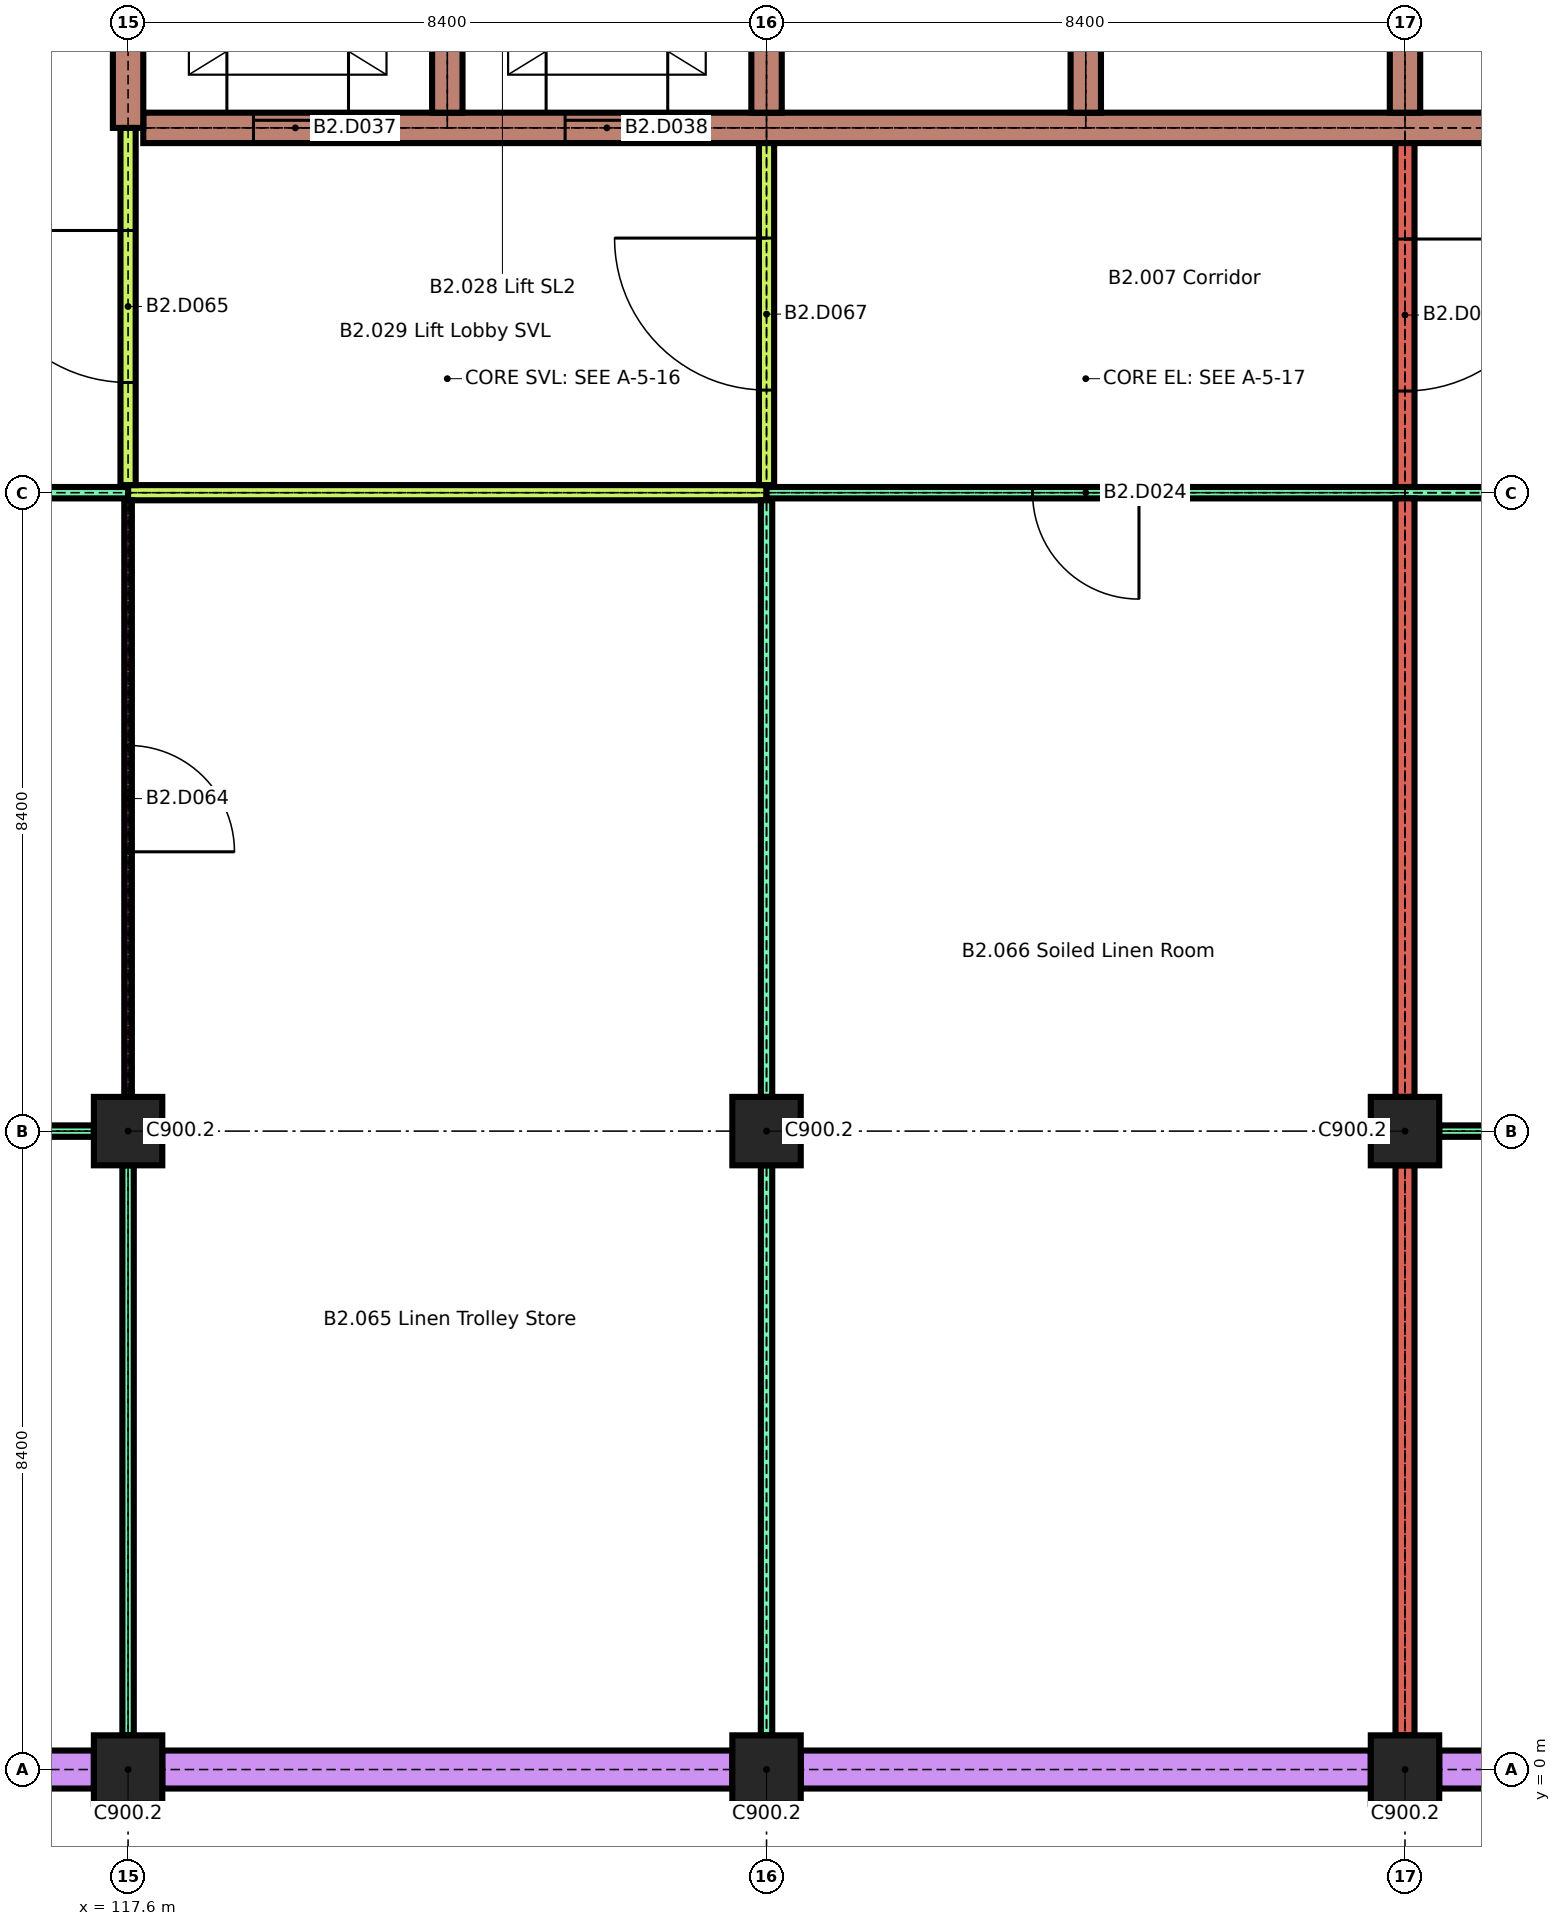
"""IFC4 building model, lengths in metres.
Left out: names, types, materials, properties, quantities, classifications, styles, units other than length and angle.
Written with IfcOpenShell. Run it as: python <this file> out.ifc"""

import sys

from ifc_helpers import new_model, si_unit, direction, frame, frame_2d, origin, origin_2d, place, context, subcontext, project, spatial, rectangle, extrude, element, fill, save


model = new_model("IFC4")
c1 = context("Model", 3, precision=1e-05, world=origin(), true_north=direction((0.0, 1.0)))
c2 = subcontext(c1, "Body", "Model", "MODEL_VIEW")
j1 = project(units=[si_unit("LENGTHUNIT", "METRE"), si_unit("PLANEANGLEUNIT", "RADIAN")], contexts=[c1])
p1 = place(None, origin())
s1 = spatial("IfcSite", under=j1, at=p1, CompositionType="ELEMENT")
p2 = place(p1, origin())
s2 = spatial("IfcBuilding", under=s1, at=p2, CompositionType="ELEMENT")
p3 = place(p2, frame((0.0, 0.0, -7.8)))
s3 = spatial("IfcBuildingStorey", under=s2, at=p3, CompositionType="ELEMENT", Elevation=-7.8)
for number, where, z_axis, x_axis in (
    (1, (117.6, 0.0, 0.0), (0.0, 0.0, 1.0), (1.0, 0.0, 0.0)),
    (2, (126.0, 0.0, 0.0), (0.0, 0.0, 1.0), (1.0, 0.0, 0.0)),
    (3, (134.4, 0.0, 0.0), (0.0, 0.0, 1.0), (1.0, 0.0, 0.0)),
    (4, (117.6, 8.4, 0.0), (0.0, 0.0, 1.0), (1.0, 0.0, 0.0)),
    (5, (126.0, 8.4, 0.0), (0.0, 0.0, 1.0), (1.0, 0.0, 0.0)),
    (6, (134.4, 8.4, 0.0), (0.0, 0.0, 1.0), (1.0, 0.0, 0.0)),
):
    element("IfcColumn", number, at=place(p3, frame(where, z_axis=z_axis, x_axis=x_axis)), inside=s3, PredefinedType="COLUMN", context=c2, shape_type="SweptSolid", body=[
        extrude(rectangle(XDim=0.9, YDim=0.9, at=origin_2d()), origin(), (0.0, 0.0, 1.0), 3.1),
    ])
for number, where, z_axis, x_axis in (
    (7, (109.65, 0.0, 0.0), (0.0, 0.0, 1.0), (1.0, 0.0, 0.0)),
    (8, (118.05, 0.0, 0.0), (0.0, 0.0, 1.0), (1.0, 0.0, 0.0)),
    (9, (126.45, 0.0, 0.0), (0.0, 0.0, 1.0), (1.0, 0.0, 0.0)),
    (10, (134.85, 0.0, 0.0), (0.0, 0.0, 1.0), (1.0, 0.0, 0.0)),
):
    element("IfcWall", number, at=place(p3, frame(where, z_axis=z_axis, x_axis=x_axis)), inside=s3, PredefinedType="SOLIDWALL", context=c2, shape_type="SweptSolid", body=[
        extrude(rectangle(XDim=7.5, YDim=0.5, at=frame_2d((3.75, 0.0))), origin(), (0.0, 0.0, 1.0), 3.1),
    ])
p4 = place(p3, frame((109.65, 8.4, 0.0), z_axis=(0.0, 0.0, 1.0), x_axis=(1.0, 0.0, 0.0)))
e11 = element("IfcWall", 11, at=p4, inside=s3, PredefinedType="PARTITIONING", context=c2, shape_type="SweptSolid", body=[
    extrude(rectangle(XDim=7.5, YDim=0.15, at=frame_2d((3.75, 0.0))), origin(), (0.0, 0.0, 1.0), 3.1),
])
p5 = place(p4, frame((3.05, 0.0, 0.0)))
e12 = element("IfcOpeningElement", 12, at=p5, cuts=e11, PredefinedType="OPENING", context=c2, shape_type="SweptSolid", body=[
    extrude(rectangle(XDim=1.4, YDim=2.1, at=frame_2d((0.7, 1.05))), frame((0.0, 0.085, 0.0), z_axis=(0.0, -1.0, 0.0), x_axis=(1.0, 0.0, 0.0)), (0.0, 0.0, 1.0), 0.17),
])
p6 = place(p3, frame((134.85, 8.4, 0.0), z_axis=(0.0, 0.0, 1.0), x_axis=(1.0, 0.0, 0.0)))
e13 = element("IfcWall", 13, at=p6, inside=s3, PredefinedType="PARTITIONING", context=c2, shape_type="SweptSolid", body=[
    extrude(rectangle(XDim=7.5, YDim=0.15, at=frame_2d((3.75, 0.0))), origin(), (0.0, 0.0, 1.0), 3.1),
])
p7 = place(p6, frame((3.2, 0.0, 0.0)))
e14 = element("IfcOpeningElement", 14, at=p7, cuts=e13, PredefinedType="OPENING", context=c2, shape_type="SweptSolid", body=[
    extrude(rectangle(XDim=1.1, YDim=2.1, at=frame_2d((0.55, 1.05))), frame((0.0, 0.085, 0.0), z_axis=(0.0, -1.0, 0.0), x_axis=(1.0, 0.0, 0.0)), (0.0, 0.0, 1.0), 0.17),
])
p8 = place(p3, frame((109.65, 16.8, 0.0), z_axis=(0.0, 0.0, 1.0), x_axis=(1.0, 0.0, 0.0)))
e15 = element("IfcWall", 15, at=p8, inside=s3, PredefinedType="PARTITIONING", context=c2, shape_type="SweptSolid", body=[
    extrude(rectangle(XDim=7.95, YDim=0.15, at=frame_2d((3.975, 0.0))), origin(), (0.0, 0.0, 1.0), 3.1),
])
p9 = place(p8, frame((3.275, 0.0, 0.0)))
e16 = element("IfcOpeningElement", 16, at=p9, cuts=e15, PredefinedType="OPENING", context=c2, shape_type="SweptSolid", body=[
    extrude(rectangle(XDim=1.4, YDim=2.1, at=frame_2d((0.7, 1.05))), frame((0.0, 0.085, 0.0), z_axis=(0.0, -1.0, 0.0), x_axis=(1.0, 0.0, 0.0)), (0.0, 0.0, 1.0), 0.17),
])
p10 = place(p3, frame((117.6, 16.8, 0.0), z_axis=(0.0, 0.0, 1.0), x_axis=(1.0, 0.0, 0.0)))
e17 = element("IfcWall", 17, at=p10, inside=s3, PredefinedType="PARTITIONING", context=c2, shape_type="SweptSolid", body=[
    extrude(rectangle(XDim=8.4, YDim=0.2, at=frame_2d((4.2, 0.0))), origin(), (0.0, 0.0, 1.0), 3.1),
])
p11 = place(p3, frame((126.0, 16.8, 0.0), z_axis=(0.0, 0.0, 1.0), x_axis=(1.0, 0.0, 0.0)))
e18 = element("IfcWall", 18, at=p11, inside=s3, PredefinedType="PARTITIONING", context=c2, shape_type="SweptSolid", body=[
    extrude(rectangle(XDim=24.75, YDim=0.15, at=frame_2d((12.375, 0.0))), origin(), (0.0, 0.0, 1.0), 3.1),
])
p12 = place(p11, frame((3.5, 0.0, 0.0)))
e19 = element("IfcOpeningElement", 19, at=p12, cuts=e18, PredefinedType="OPENING", context=c2, shape_type="SweptSolid", body=[
    extrude(rectangle(XDim=1.4, YDim=2.1, at=frame_2d((0.7, 1.05))), frame((0.0, 0.085, 0.0), z_axis=(0.0, -1.0, 0.0), x_axis=(1.0, 0.0, 0.0)), (0.0, 0.0, 1.0), 0.17),
])
p13 = place(p11, frame((11.9, 0.0, 0.0)))
e20 = element("IfcOpeningElement", 20, at=p13, cuts=e18, PredefinedType="OPENING", context=c2, shape_type="SweptSolid", body=[
    extrude(rectangle(XDim=1.4, YDim=2.1, at=frame_2d((0.7, 1.05))), frame((0.0, 0.085, 0.0), z_axis=(0.0, -1.0, 0.0), x_axis=(1.0, 0.0, 0.0)), (0.0, 0.0, 1.0), 0.17),
])
p14 = place(p11, frame((20.075, 0.0, 0.0)))
e21 = element("IfcOpeningElement", 21, at=p14, cuts=e18, PredefinedType="OPENING", context=c2, shape_type="SweptSolid", body=[
    extrude(rectangle(XDim=1.4, YDim=2.1, at=frame_2d((0.7, 1.05))), frame((0.0, 0.085, 0.0), z_axis=(0.0, -1.0, 0.0), x_axis=(1.0, 0.0, 0.0)), (0.0, 0.0, 1.0), 0.17),
])
p15 = place(p3, frame((117.8, 21.6, 0.0), z_axis=(0.0, 0.0, 1.0), x_axis=(1.0, 0.0, 0.0)))
e22 = element("IfcWall", 22, at=p15, inside=s3, PredefinedType="SHEAR", context=c2, shape_type="SweptSolid", body=[
    extrude(rectangle(XDim=25.0, YDim=0.4, at=frame_2d((12.5, 0.0))), origin(), (0.0, 0.0, 1.0), 3.1),
])
p16 = place(p15, frame((1.45, 0.0, 0.0)))
e23 = element("IfcOpeningElement", 23, at=p16, cuts=e22, PredefinedType="OPENING", context=c2, shape_type="SweptSolid", body=[
    extrude(rectangle(XDim=1.1, YDim=2.1, at=frame_2d((0.55, 1.05))), frame((0.0, 0.21, 0.0), z_axis=(0.0, -1.0, 0.0), x_axis=(1.0, 0.0, 0.0)), (0.0, 0.0, 1.0), 0.42),
])
p17 = place(p15, frame((5.55, 0.0, 0.0)))
e24 = element("IfcOpeningElement", 24, at=p17, cuts=e22, PredefinedType="OPENING", context=c2, shape_type="SweptSolid", body=[
    extrude(rectangle(XDim=1.1, YDim=2.1, at=frame_2d((0.55, 1.05))), frame((0.0, 0.21, 0.0), z_axis=(0.0, -1.0, 0.0), x_axis=(1.0, 0.0, 0.0)), (0.0, 0.0, 1.0), 0.42),
])
p18 = place(p3, frame((117.6, 0.45, 0.0), z_axis=(0.0, 0.0, 1.0), x_axis=(0.0, 1.0, 0.0)))
e25 = element("IfcWall", 25, at=p18, inside=s3, PredefinedType="PARTITIONING", context=c2, shape_type="SweptSolid", body=[
    extrude(rectangle(XDim=7.5, YDim=0.15, at=frame_2d((3.75, 0.0))), origin(), (0.0, 0.0, 1.0), 3.1),
])
p19 = place(p3, frame((117.6, 8.85, 0.0), z_axis=(0.0, 0.0, 1.0), x_axis=(0.0, 1.0, 0.0)))
e26 = element("IfcWall", 26, at=p19, inside=s3, PredefinedType="PARTITIONING", context=c2, shape_type="SweptSolid", body=[
    extrude(rectangle(XDim=7.85, YDim=0.1, at=frame_2d((3.925, 0.0))), origin(), (0.0, 0.0, 1.0), 3.1),
])
p20 = place(p19, frame((3.225, 0.0, 0.0)))
e27 = element("IfcOpeningElement", 27, at=p20, cuts=e26, PredefinedType="OPENING", context=c2, shape_type="SweptSolid", body=[
    extrude(rectangle(XDim=1.4, YDim=2.1, at=frame_2d((0.7, 1.05))), frame((0.0, 0.06, 0.0), z_axis=(0.0, -1.0, 0.0), x_axis=(1.0, 0.0, 0.0)), (0.0, 0.0, 1.0), 0.12),
])
p21 = place(p3, frame((117.6, 16.9, 0.0), z_axis=(0.0, 0.0, 1.0), x_axis=(0.0, 1.0, 0.0)))
e28 = element("IfcWall", 28, at=p21, inside=s3, PredefinedType="PARTITIONING", context=c2, shape_type="SweptSolid", body=[
    extrude(rectangle(XDim=4.7, YDim=0.2, at=frame_2d((2.35, 0.0))), origin(), (0.0, 0.0, 1.0), 3.1),
])
p22 = place(p21, frame((1.35, 0.0, 0.0)))
e29 = element("IfcOpeningElement", 29, at=p22, cuts=e28, PredefinedType="OPENING", context=c2, shape_type="SweptSolid", body=[
    extrude(rectangle(XDim=2.0, YDim=2.4, at=frame_2d((1.0, 1.2))), frame((0.0, 0.11, 0.0), z_axis=(0.0, -1.0, 0.0), x_axis=(1.0, 0.0, 0.0)), (0.0, 0.0, 1.0), 0.22),
])
p23 = place(p3, frame((117.6, 21.6, 0.0), z_axis=(0.0, 0.0, 1.0), x_axis=(0.0, 1.0, 0.0)))
e30 = element("IfcWall", 30, at=p23, inside=s3, PredefinedType="SHEAR", context=c2, shape_type="SweptSolid", body=[
    extrude(rectangle(XDim=3.6, YDim=0.4, at=frame_2d((1.8, 0.0))), origin(), (0.0, 0.0, 1.0), 3.1),
])
p24 = place(p3, frame((121.8, 21.8, 0.0), z_axis=(0.0, 0.0, 1.0), x_axis=(0.0, 1.0, 0.0)))
e31 = element("IfcWall", 31, at=p24, inside=s3, PredefinedType="SHEAR", context=c2, shape_type="SweptSolid", body=[
    extrude(rectangle(XDim=3.2, YDim=0.4, at=frame_2d((1.6, 0.0))), origin(), (0.0, 0.0, 1.0), 3.1),
])
p25 = place(p3, frame((126.0, 0.45, 0.0), z_axis=(0.0, 0.0, 1.0), x_axis=(0.0, 1.0, 0.0)))
e32 = element("IfcWall", 32, at=p25, inside=s3, PredefinedType="PARTITIONING", context=c2, shape_type="SweptSolid", body=[
    extrude(rectangle(XDim=7.5, YDim=0.15, at=frame_2d((3.75, 0.0))), origin(), (0.0, 0.0, 1.0), 3.1),
])
p26 = place(p3, frame((126.0, 8.85, 0.0), z_axis=(0.0, 0.0, 1.0), x_axis=(0.0, 1.0, 0.0)))
e33 = element("IfcWall", 33, at=p26, inside=s3, PredefinedType="PARTITIONING", context=c2, shape_type="SweptSolid", body=[
    extrude(rectangle(XDim=7.85, YDim=0.15, at=frame_2d((3.925, 0.0))), origin(), (0.0, 0.0, 1.0), 3.1),
])
p27 = place(p3, frame((126.0, 16.9, 0.0), z_axis=(0.0, 0.0, 1.0), x_axis=(0.0, 1.0, 0.0)))
e34 = element("IfcWall", 34, at=p27, inside=s3, PredefinedType="PARTITIONING", context=c2, shape_type="SweptSolid", body=[
    extrude(rectangle(XDim=4.5, YDim=0.2, at=frame_2d((2.25, 0.0))), origin(), (0.0, 0.0, 1.0), 3.1),
])
p28 = place(p27, frame((1.25, 0.0, 0.0)))
e35 = element("IfcOpeningElement", 35, at=p28, cuts=e34, PredefinedType="OPENING", context=c2, shape_type="SweptSolid", body=[
    extrude(rectangle(XDim=2.0, YDim=2.4, at=frame_2d((1.0, 1.2))), frame((0.0, 0.11, 0.0), z_axis=(0.0, -1.0, 0.0), x_axis=(1.0, 0.0, 0.0)), (0.0, 0.0, 1.0), 0.22),
])
for number, where, z_axis, x_axis in (
    (36, (126.0, 21.8, 0.0), (0.0, 0.0, 1.0), (0.0, 1.0, 0.0)),
    (37, (130.2, 21.8, 0.0), (0.0, 0.0, 1.0), (0.0, 1.0, 0.0)),
):
    element("IfcWall", number, at=place(p3, frame(where, z_axis=z_axis, x_axis=x_axis)), inside=s3, PredefinedType="SHEAR", context=c2, shape_type="SweptSolid", body=[
        extrude(rectangle(XDim=3.2, YDim=0.4, at=frame_2d((1.6, 0.0))), origin(), (0.0, 0.0, 1.0), 3.1),
    ])
p29 = place(p3, frame((134.4, 0.45, 0.0), z_axis=(0.0, 0.0, 1.0), x_axis=(0.0, 1.0, 0.0)))
e38 = element("IfcWall", 38, at=p29, inside=s3, PredefinedType="SOLIDWALL", context=c2, shape_type="SweptSolid", body=[
    extrude(rectangle(XDim=7.5, YDim=0.25, at=frame_2d((3.75, 0.0))), origin(), (0.0, 0.0, 1.0), 3.1),
])
p30 = place(p3, frame((134.4, 8.85, 0.0), z_axis=(0.0, 0.0, 1.0), x_axis=(0.0, 1.0, 0.0)))
e39 = element("IfcWall", 39, at=p30, inside=s3, PredefinedType="SOLIDWALL", context=c2, shape_type="SweptSolid", body=[
    extrude(rectangle(XDim=7.875, YDim=0.25, at=frame_2d((3.938, 0.0))), origin(), (0.0, 0.0, 1.0), 3.1),
])
p31 = place(p3, frame((134.4, 16.875, 0.0), z_axis=(0.0, 0.0, 1.0), x_axis=(0.0, 1.0, 0.0)))
e40 = element("IfcWall", 40, at=p31, inside=s3, PredefinedType="SOLIDWALL", context=c2, shape_type="SweptSolid", body=[
    extrude(rectangle(XDim=4.525, YDim=0.25, at=frame_2d((2.262, 0.0))), origin(), (0.0, 0.0, 1.0), 3.1),
])
p32 = place(p31, frame((1.262, 0.0, 0.0)))
e41 = element("IfcOpeningElement", 41, at=p32, cuts=e40, PredefinedType="OPENING", context=c2, shape_type="SweptSolid", body=[
    extrude(rectangle(XDim=2.0, YDim=2.4, at=frame_2d((1.0, 1.2))), frame((0.0, 0.135, 0.0), z_axis=(0.0, -1.0, 0.0), x_axis=(1.0, 0.0, 0.0)), (0.0, 0.0, 1.0), 0.27),
])
p33 = place(p3, frame((134.4, 21.8, 0.0), z_axis=(0.0, 0.0, 1.0), x_axis=(0.0, 1.0, 0.0)))
e42 = element("IfcWall", 42, at=p33, inside=s3, PredefinedType="SHEAR", context=c2, shape_type="SweptSolid", body=[
    extrude(rectangle(XDim=3.2, YDim=0.4, at=frame_2d((1.6, 0.0))), origin(), (0.0, 0.0, 1.0), 3.1),
])
p34 = place(p12, origin())
e43 = element("IfcDoor", 43, at=p34, inside=s3, OperationType="SINGLE_SWING_RIGHT", PredefinedType="DOOR", context=c2, shape_type="SweptSolid", body=[
    extrude(rectangle(XDim=1.4, YDim=2.1, at=frame_2d((0.7, 1.05))), frame((0.0, 0.025, 0.0), z_axis=(0.0, -1.0, 0.0), x_axis=(1.0, 0.0, 0.0)), (0.0, 0.0, 1.0), 0.05),
])
fill(e19, e43)
p35 = place(p16, origin())
e44 = element("IfcDoor", 44, at=p35, inside=s3, OperationType="SLIDING_TO_LEFT", PredefinedType="DOOR", context=c2, shape_type="SweptSolid", body=[
    extrude(rectangle(XDim=1.1, YDim=2.1, at=frame_2d((0.55, 1.05))), frame((0.0, 0.025, 0.0), z_axis=(0.0, -1.0, 0.0), x_axis=(1.0, 0.0, 0.0)), (0.0, 0.0, 1.0), 0.05),
])
fill(e23, e44)
p36 = place(p17, origin())
e45 = element("IfcDoor", 45, at=p36, inside=s3, OperationType="SLIDING_TO_LEFT", PredefinedType="DOOR", context=c2, shape_type="SweptSolid", body=[
    extrude(rectangle(XDim=1.1, YDim=2.1, at=frame_2d((0.55, 1.05))), frame((0.0, 0.025, 0.0), z_axis=(0.0, -1.0, 0.0), x_axis=(1.0, 0.0, 0.0)), (0.0, 0.0, 1.0), 0.05),
])
fill(e24, e45)
p37 = place(p20, origin())
e46 = element("IfcDoor", 46, at=p37, inside=s3, OperationType="SINGLE_SWING_LEFT", PredefinedType="DOOR", context=c2, shape_type="SweptSolid", body=[
    extrude(rectangle(XDim=1.4, YDim=2.1, at=frame_2d((0.7, 1.05))), frame((0.0, 0.025, 0.0), z_axis=(0.0, -1.0, 0.0), x_axis=(1.0, 0.0, 0.0)), (0.0, 0.0, 1.0), 0.05),
])
fill(e27, e46)
p38 = place(p22, origin())
e47 = element("IfcDoor", 47, at=p38, inside=s3, OperationType="SINGLE_SWING_LEFT", PredefinedType="DOOR", context=c2, shape_type="SweptSolid", body=[
    extrude(rectangle(XDim=2.0, YDim=2.4, at=frame_2d((1.0, 1.2))), frame((0.0, 0.03, 0.0), z_axis=(0.0, -1.0, 0.0), x_axis=(1.0, 0.0, 0.0)), (0.0, 0.0, 1.0), 0.06),
])
fill(e29, e47)
p39 = place(p28, origin())
e48 = element("IfcDoor", 48, at=p39, inside=s3, OperationType="SINGLE_SWING_LEFT", PredefinedType="DOOR", context=c2, shape_type="SweptSolid", body=[
    extrude(rectangle(XDim=2.0, YDim=2.4, at=frame_2d((1.0, 1.2))), frame((0.0, 0.03, 0.0), z_axis=(0.0, -1.0, 0.0), x_axis=(1.0, 0.0, 0.0)), (0.0, 0.0, 1.0), 0.06),
])
fill(e35, e48)
p40 = place(p32, origin())
e49 = element("IfcDoor", 49, at=p40, inside=s3, OperationType="SINGLE_SWING_RIGHT", PredefinedType="DOOR", context=c2, shape_type="SweptSolid", body=[
    extrude(rectangle(XDim=2.0, YDim=2.4, at=frame_2d((1.0, 1.2))), frame((0.0, 0.03, 0.0), z_axis=(0.0, -1.0, 0.0), x_axis=(1.0, 0.0, 0.0)), (0.0, 0.0, 1.0), 0.06),
])
fill(e41, e49)
save(model, sys.argv[1])
